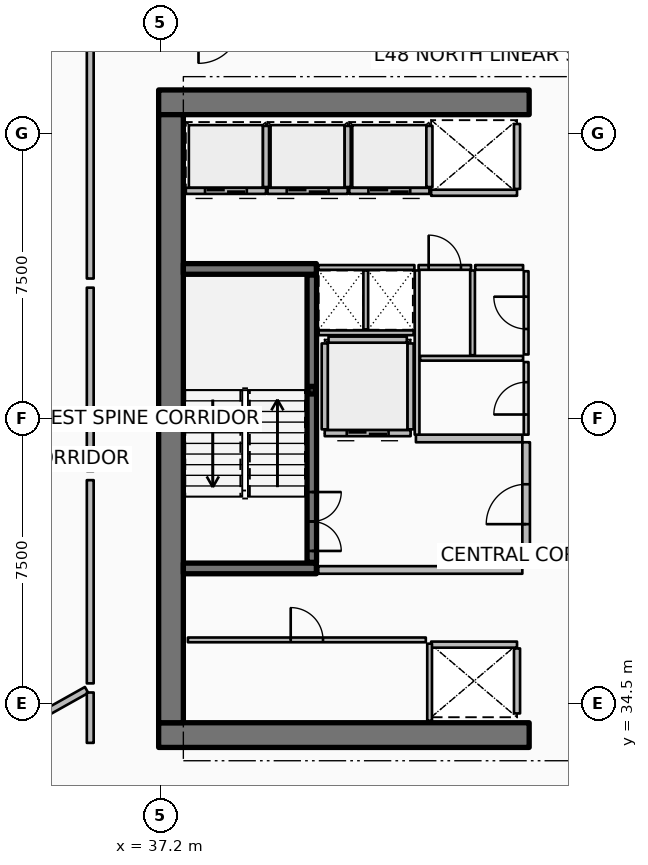
"""IFC4 building model, lengths in metres.
Left out: names, types, materials, properties, quantities, classifications, styles, units other than length and angle.
Written with IfcOpenShell. Run it as: python <this file> out.ifc"""

import sys

from ifc_helpers import new_model, si_unit, direction, frame, frame_2d, origin, origin_2d, place, context, subcontext, project, spatial, rectangle, hollow_rectangle, extrude, element, fill, save


model = new_model("IFC4")
c1 = context("Model", 3, precision=1e-05, world=origin(), true_north=direction((0.0, 1.0)))
c2 = subcontext(c1, "Body", "Model", "MODEL_VIEW")
j1 = project(units=[si_unit("LENGTHUNIT", "METRE"), si_unit("PLANEANGLEUNIT", "RADIAN")], contexts=[c1])
p1 = place(None, origin())
s1 = spatial("IfcSite", under=j1, at=p1, CompositionType="ELEMENT")
p2 = place(p1, origin())
s2 = spatial("IfcBuilding", under=s1, at=p2, CompositionType="ELEMENT")
p3 = place(p2, frame((0.0, 0.0, 191.55)))
s3 = spatial("IfcBuildingStorey", under=s2, at=p3, CompositionType="ELEMENT", Elevation=191.55)
for number, where, z_axis, x_axis in (
    (1, (37.15, 33.675, 0.0), (0.0, 0.0, 1.0), (1.0, 0.0, 0.0)),
    (2, (37.15, 50.325, 0.0), (0.0, 0.0, 1.0), (1.0, 0.0, 0.0)),
):
    element("IfcWall", number, at=place(p3, frame(where, z_axis=z_axis, x_axis=x_axis)), inside=s3, PredefinedType="SHEAR", context=c2, shape_type="SweptSolid", body=[
        extrude(rectangle(XDim=9.75, YDim=0.65, at=frame_2d((4.875, 0.0))), origin(), (0.0, 0.0, 1.0), 3.75),
    ])
p4 = place(p3, frame((37.475, 34.0, 0.0), z_axis=(0.0, 0.0, 1.0), x_axis=(0.0, 1.0, 0.0)))
e3 = element("IfcWall", 3, at=p4, inside=s3, PredefinedType="SHEAR", context=c2, shape_type="SweptSolid", body=[
    extrude(rectangle(XDim=16.0, YDim=0.65, at=frame_2d((8.0, 0.0))), origin(), (0.0, 0.0, 1.0), 3.75),
])
for number, where, z_axis, x_axis in (
    (4, (37.8, 38.06, 0.0), (0.0, 0.0, 1.0), (1.0, 0.0, 0.0)),
    (5, (37.8, 45.94, 0.0), (0.0, 0.0, 1.0), (1.0, 0.0, 0.0)),
):
    element("IfcWall", number, at=place(p3, frame(where, z_axis=z_axis, x_axis=x_axis)), inside=s3, PredefinedType="SHEAR", context=c2, shape_type="SweptSolid", body=[
        extrude(rectangle(XDim=3.5, YDim=0.28, at=frame_2d((1.75, 0.0))), origin(), (0.0, 0.0, 1.0), 3.75),
    ])
p5 = place(p3, frame((41.18, 42.75, 0.0), z_axis=(0.0, 0.0, 1.0), x_axis=(1.0, 0.0, 0.0)))
e6 = element("IfcColumn", 6, at=p5, inside=s3, PredefinedType="COLUMN", context=c2, shape_type="SweptSolid", body=[
    extrude(hollow_rectangle(XDim=0.2, YDim=0.2, WallThickness=0.01, InnerFilletRadius=0.01, OuterFilletRadius=0.02, at=origin_2d()), origin(), (0.0, 0.0, 1.0), 1.67),
])
p6 = place(p3, frame((41.18, 38.22, 0.0), z_axis=(0.0, 0.0, 1.0), x_axis=(0.0, 1.0, 0.0)))
e7 = element("IfcWall", 7, at=p6, inside=s3, PredefinedType="SOLIDWALL", context=c2, shape_type="SweptSolid", body=[
    extrude(rectangle(XDim=7.56, YDim=0.25, at=frame_2d((3.78, 0.0))), origin(), (0.0, 0.0, 1.0), 3.5),
])
p7 = place(p6, frame((0.3, 0.0, 0.0)))
e8 = element("IfcOpeningElement", 8, at=p7, cuts=e7, PredefinedType="OPENING", context=c2, shape_type="SweptSolid", body=[
    extrude(rectangle(XDim=1.55, YDim=2.15, at=frame_2d((0.775, 1.075))), frame((0.0, 0.135, 0.0), z_axis=(0.0, -1.0, 0.0), x_axis=(1.0, 0.0, 0.0)), (0.0, 0.0, 1.0), 0.27),
])
p8 = place(p3, frame((39.975, 47.995, 0.0), z_axis=(0.0, 0.0, 1.0), x_axis=(-1.0, 0.0, 0.0)))
e9 = element("IfcWall", 9, at=p8, inside=s3, PredefinedType="PARTITIONING", context=c2, shape_type="SweptSolid", body=[
    extrude(rectangle(XDim=2.11, YDim=0.16, at=frame_2d((1.055, 0.0))), origin(), (0.0, 0.0, 1.0), 3.5),
])
p9 = place(p8, frame((0.505, 0.0, 0.0)))
e10 = element("IfcOpeningElement", 10, at=p9, cuts=e9, PredefinedType="OPENING", context=c2, shape_type="SweptSolid", body=[
    extrude(rectangle(XDim=1.1, YDim=2.1, at=frame_2d((0.55, 1.05))), frame((0.0, 0.09, 0.0), z_axis=(0.0, -1.0, 0.0), x_axis=(1.0, 0.0, 0.0)), (0.0, 0.0, 1.0), 0.18),
])
p10 = place(p3, frame((39.975, 48.095, 0.0), z_axis=(0.0, 0.0, 1.0), x_axis=(0.0, 1.0, 0.0)))
e11 = element("IfcWall", 11, at=p10, inside=s3, PredefinedType="PARTITIONING", context=c2, shape_type="SweptSolid", body=[
    extrude(rectangle(XDim=1.61, YDim=0.16, at=frame_2d((0.805, 0.0))), origin(), (0.0, 0.0, 1.0), 3.5),
])
p11 = place(p3, frame((42.125, 47.995, 0.0), z_axis=(0.0, 0.0, 1.0), x_axis=(-1.0, 0.0, 0.0)))
e12 = element("IfcWall", 12, at=p11, inside=s3, PredefinedType="PARTITIONING", context=c2, shape_type="SweptSolid", body=[
    extrude(rectangle(XDim=2.11, YDim=0.16, at=frame_2d((1.055, 0.0))), origin(), (0.0, 0.0, 1.0), 3.5),
])
p12 = place(p11, frame((0.505, 0.0, 0.0)))
e13 = element("IfcOpeningElement", 13, at=p12, cuts=e12, PredefinedType="OPENING", context=c2, shape_type="SweptSolid", body=[
    extrude(rectangle(XDim=1.1, YDim=2.1, at=frame_2d((0.55, 1.05))), frame((0.0, 0.09, 0.0), z_axis=(0.0, -1.0, 0.0), x_axis=(1.0, 0.0, 0.0)), (0.0, 0.0, 1.0), 0.18),
])
p13 = place(p3, frame((42.125, 48.095, 0.0), z_axis=(0.0, 0.0, 1.0), x_axis=(0.0, 1.0, 0.0)))
e14 = element("IfcWall", 14, at=p13, inside=s3, PredefinedType="PARTITIONING", context=c2, shape_type="SweptSolid", body=[
    extrude(rectangle(XDim=1.61, YDim=0.16, at=frame_2d((0.805, 0.0))), origin(), (0.0, 0.0, 1.0), 3.5),
])
p14 = place(p3, frame((44.275, 47.995, 0.0), z_axis=(0.0, 0.0, 1.0), x_axis=(-1.0, 0.0, 0.0)))
e15 = element("IfcWall", 15, at=p14, inside=s3, PredefinedType="PARTITIONING", context=c2, shape_type="SweptSolid", body=[
    extrude(rectangle(XDim=2.11, YDim=0.16, at=frame_2d((1.055, 0.0))), origin(), (0.0, 0.0, 1.0), 3.5),
])
p15 = place(p14, frame((0.505, 0.0, 0.0)))
e16 = element("IfcOpeningElement", 16, at=p15, cuts=e15, PredefinedType="OPENING", context=c2, shape_type="SweptSolid", body=[
    extrude(rectangle(XDim=1.1, YDim=2.1, at=frame_2d((0.55, 1.05))), frame((0.0, 0.09, 0.0), z_axis=(0.0, -1.0, 0.0), x_axis=(1.0, 0.0, 0.0)), (0.0, 0.0, 1.0), 0.18),
])
p16 = place(p3, frame((44.275, 48.095, 0.0), z_axis=(0.0, 0.0, 1.0), x_axis=(0.0, 1.0, 0.0)))
e17 = element("IfcWall", 17, at=p16, inside=s3, PredefinedType="PARTITIONING", context=c2, shape_type="SweptSolid", body=[
    extrude(rectangle(XDim=1.61, YDim=0.16, at=frame_2d((0.805, 0.0))), origin(), (0.0, 0.0, 1.0), 3.5),
])
p17 = place(p3, frame((46.58, 47.945, 0.0), z_axis=(0.0, 0.0, 1.0), x_axis=(-1.0, 0.0, 0.0)))
e18 = element("IfcWall", 18, at=p17, inside=s3, PredefinedType="PARTITIONING", context=c2, shape_type="SweptSolid", body=[
    extrude(rectangle(XDim=2.26, YDim=0.16, at=frame_2d((1.13, 0.0))), origin(), (0.0, 0.0, 1.0), 3.5),
])
p18 = place(p3, frame((46.58, 48.045, 0.0), z_axis=(0.0, 0.0, 1.0), x_axis=(0.0, 1.0, 0.0)))
e19 = element("IfcWall", 19, at=p18, inside=s3, PredefinedType="PARTITIONING", context=c2, shape_type="SweptSolid", body=[
    extrude(rectangle(XDim=1.71, YDim=0.16, at=frame_2d((0.855, 0.0))), origin(), (0.0, 0.0, 1.0), 3.5),
])
p19 = place(p3, frame((44.32, 36.055, 0.0), z_axis=(0.0, 0.0, 1.0), x_axis=(1.0, 0.0, 0.0)))
e20 = element("IfcWall", 20, at=p19, inside=s3, PredefinedType="PARTITIONING", context=c2, shape_type="SweptSolid", body=[
    extrude(rectangle(XDim=2.26, YDim=0.16, at=frame_2d((1.13, 0.0))), origin(), (0.0, 0.0, 1.0), 3.5),
])
p20 = place(p3, frame((46.58, 34.245, 0.0), z_axis=(0.0, 0.0, 1.0), x_axis=(0.0, 1.0, 0.0)))
e21 = element("IfcWall", 21, at=p20, inside=s3, PredefinedType="PARTITIONING", context=c2, shape_type="SweptSolid", body=[
    extrude(rectangle(XDim=1.71, YDim=0.16, at=frame_2d((0.855, 0.0))), origin(), (0.0, 0.0, 1.0), 3.5),
])
p21 = place(p3, frame((43.78, 41.62, 0.0), z_axis=(0.0, 0.0, 1.0), x_axis=(-1.0, 0.0, 0.0)))
e22 = element("IfcWall", 22, at=p21, inside=s3, PredefinedType="PARTITIONING", context=c2, shape_type="SweptSolid", body=[
    extrude(rectangle(XDim=2.26, YDim=0.16, at=frame_2d((1.13, 0.0))), origin(), (0.0, 0.0, 1.0), 3.5),
])
p22 = place(p21, frame((0.58, 0.0, 0.0)))
e23 = element("IfcOpeningElement", 23, at=p22, cuts=e22, PredefinedType="OPENING", context=c2, shape_type="SweptSolid", body=[
    extrude(rectangle(XDim=1.1, YDim=2.1, at=frame_2d((0.55, 1.05))), frame((0.0, 0.09, 0.0), z_axis=(0.0, -1.0, 0.0), x_axis=(1.0, 0.0, 0.0)), (0.0, 0.0, 1.0), 0.18),
])
for number, where, z_axis, x_axis in (
    (24, (43.78, 41.72, 0.0), (0.0, 0.0, 1.0), (0.0, 1.0, 0.0)),
    (25, (41.52, 41.72, 0.0), (0.0, 0.0, 1.0), (0.0, 1.0, 0.0)),
):
    element("IfcWall", number, at=place(p3, frame(where, z_axis=z_axis, x_axis=x_axis)), inside=s3, PredefinedType="PARTITIONING", context=c2, shape_type="SweptSolid", body=[
        extrude(rectangle(XDim=2.26, YDim=0.16, at=frame_2d((1.13, 0.0))), origin(), (0.0, 0.0, 1.0), 3.5),
    ])
p23 = place(p3, frame((41.62, 44.08, 0.0), z_axis=(0.0, 0.0, 1.0), x_axis=(1.0, 0.0, 0.0)))
e26 = element("IfcWall", 26, at=p23, inside=s3, PredefinedType="PARTITIONING", context=c2, shape_type="SweptSolid", body=[
    extrude(rectangle(XDim=2.06, YDim=0.16, at=frame_2d((1.03, 0.0))), origin(), (0.0, 0.0, 1.0), 3.5),
])
p24 = place(p3, frame((44.28, 34.05, 0.0), z_axis=(0.0, 0.0, 1.0), x_axis=(0.0, 1.0, 0.0)))
e27 = element("IfcWall", 27, at=p24, inside=s3, PredefinedType="PARTITIONING", context=c2, shape_type="SweptSolid", body=[
    extrude(rectangle(XDim=2.03, YDim=0.125, at=frame_2d((1.015, 0.0))), origin(), (0.0, 0.0, 1.0), 2.94),
])
p25 = place(p3, frame((37.92, 36.18, 0.0), z_axis=(0.0, 0.0, 1.0), x_axis=(1.0, 0.0, 0.0)))
e28 = element("IfcWall", 28, at=p25, inside=s3, PredefinedType="PARTITIONING", context=c2, shape_type="SweptSolid", body=[
    extrude(rectangle(XDim=6.26, YDim=0.125, at=frame_2d((3.13, 0.0))), origin(), (0.0, 0.0, 1.0), 2.94),
])
p26 = place(p25, frame((2.705, 0.0, 0.0)))
e29 = element("IfcOpeningElement", 29, at=p26, cuts=e28, PredefinedType="OPENING", context=c2, shape_type="SweptSolid", body=[
    extrude(rectangle(XDim=0.85, YDim=2.06, at=frame_2d((0.425, 1.03))), frame((0.0, 0.073, 0.0), z_axis=(0.0, -1.0, 0.0), x_axis=(1.0, 0.0, 0.0)), (0.0, 0.0, 1.0), 0.145),
])
p27 = place(p3, frame((41.35, 38.02, 0.0), z_axis=(0.0, 0.0, 1.0), x_axis=(1.0, 0.0, 0.0)))
e30 = element("IfcWall", 30, at=p27, inside=s3, PredefinedType="PARTITIONING", context=c2, shape_type="SweptSolid", body=[
    extrude(rectangle(XDim=5.37, YDim=0.2, at=frame_2d((2.685, 0.0))), origin(), (0.0, 0.0, 1.0), 3.5),
])
p28 = place(p3, frame((43.92, 41.48, 0.0), z_axis=(0.0, 0.0, 1.0), x_axis=(1.0, 0.0, 0.0)))
e31 = element("IfcWall", 31, at=p28, inside=s3, PredefinedType="PARTITIONING", context=c2, shape_type="SweptSolid", body=[
    extrude(rectangle(XDim=2.8, YDim=0.2, at=frame_2d((1.4, 0.0))), origin(), (0.0, 0.0, 1.0), 3.5),
])
p29 = place(p3, frame((46.82, 38.12, 0.0), z_axis=(0.0, 0.0, 1.0), x_axis=(0.0, 1.0, 0.0)))
e32 = element("IfcWall", 32, at=p29, inside=s3, PredefinedType="PARTITIONING", context=c2, shape_type="SweptSolid", body=[
    extrude(rectangle(XDim=3.26, YDim=0.2, at=frame_2d((1.63, 0.0))), origin(), (0.0, 0.0, 1.0), 3.5),
])
p30 = place(p29, frame((1.105, 0.0, 0.0)))
e33 = element("IfcOpeningElement", 33, at=p30, cuts=e32, PredefinedType="OPENING", context=c2, shape_type="SweptSolid", body=[
    extrude(rectangle(XDim=1.05, YDim=2.1, at=frame_2d((0.525, 1.05))), frame((0.0, 0.11, 0.0), z_axis=(0.0, -1.0, 0.0), x_axis=(1.0, 0.0, 0.0)), (0.0, 0.0, 1.0), 0.22),
])
p31 = place(p3, frame((41.36, 44.26, 0.0), z_axis=(0.0, 0.0, 1.0), x_axis=(1.0, 0.0, 0.0)))
e34 = element("IfcWall", 34, at=p31, inside=s3, PredefinedType="PARTITIONING", context=c2, shape_type="SweptSolid", body=[
    extrude(rectangle(XDim=2.5, YDim=0.125, at=frame_2d((1.25, 0.0))), origin(), (0.0, 0.0, 1.0), 2.94),
])
p32 = place(p3, frame((42.6, 44.35, 0.0), z_axis=(0.0, 0.0, 1.0), x_axis=(0.0, 1.0, 0.0)))
e35 = element("IfcWall", 35, at=p32, inside=s3, PredefinedType="PARTITIONING", context=c2, shape_type="SweptSolid", body=[
    extrude(rectangle(XDim=1.55, YDim=0.125, at=frame_2d((0.775, 0.0))), origin(), (0.0, 0.0, 1.0), 2.94),
])
p33 = place(p3, frame((43.95, 41.58, 0.0), z_axis=(0.0, 0.0, 1.0), x_axis=(0.0, 1.0, 0.0)))
e36 = element("IfcWall", 36, at=p33, inside=s3, PredefinedType="PARTITIONING", context=c2, shape_type="SweptSolid", body=[
    extrude(rectangle(XDim=4.32, YDim=0.125, at=frame_2d((2.16, 0.0))), origin(), (0.0, 0.0, 1.0), 2.94),
])
p34 = place(p3, frame((44.03, 43.59, 0.0), z_axis=(0.0, 0.0, 1.0), x_axis=(1.0, 0.0, 0.0)))
e37 = element("IfcWall", 37, at=p34, inside=s3, PredefinedType="PARTITIONING", context=c2, shape_type="SweptSolid", body=[
    extrude(rectangle(XDim=2.71, YDim=0.125, at=frame_2d((1.355, 0.0))), origin(), (0.0, 0.0, 1.0), 2.94),
])
p35 = place(p3, frame((45.41, 43.67, 0.0), z_axis=(0.0, 0.0, 1.0), x_axis=(0.0, 1.0, 0.0)))
e38 = element("IfcWall", 38, at=p35, inside=s3, PredefinedType="PARTITIONING", context=c2, shape_type="SweptSolid", body=[
    extrude(rectangle(XDim=2.23, YDim=0.125, at=frame_2d((1.115, 0.0))), origin(), (0.0, 0.0, 1.0), 2.94),
])
p36 = place(p3, frame((46.82, 41.58, 0.0), z_axis=(0.0, 0.0, 1.0), x_axis=(0.0, 1.0, 0.0)))
e39 = element("IfcWall", 39, at=p36, inside=s3, PredefinedType="PARTITIONING", context=c2, shape_type="SweptSolid", body=[
    extrude(rectangle(XDim=1.91, YDim=0.125, at=frame_2d((0.955, 0.0))), origin(), (0.0, 0.0, 1.0), 2.94),
])
p37 = place(p36, frame((0.53, 0.0, 0.0)))
e40 = element("IfcOpeningElement", 40, at=p37, cuts=e39, PredefinedType="OPENING", context=c2, shape_type="SweptSolid", body=[
    extrude(rectangle(XDim=0.85, YDim=2.06, at=frame_2d((0.425, 1.03))), frame((0.0, 0.073, 0.0), z_axis=(0.0, -1.0, 0.0), x_axis=(1.0, 0.0, 0.0)), (0.0, 0.0, 1.0), 0.145),
])
p38 = place(p3, frame((46.82, 43.69, 0.0), z_axis=(0.0, 0.0, 1.0), x_axis=(0.0, 1.0, 0.0)))
e41 = element("IfcWall", 41, at=p38, inside=s3, PredefinedType="PARTITIONING", context=c2, shape_type="SweptSolid", body=[
    extrude(rectangle(XDim=2.19, YDim=0.125, at=frame_2d((1.095, 0.0))), origin(), (0.0, 0.0, 1.0), 2.94),
])
p39 = place(p38, frame((0.67, 0.0, 0.0)))
e42 = element("IfcOpeningElement", 42, at=p39, cuts=e41, PredefinedType="OPENING", context=c2, shape_type="SweptSolid", body=[
    extrude(rectangle(XDim=0.85, YDim=2.06, at=frame_2d((0.425, 1.03))), frame((0.0, 0.073, 0.0), z_axis=(0.0, -1.0, 0.0), x_axis=(1.0, 0.0, 0.0)), (0.0, 0.0, 1.0), 0.145),
])
p40 = place(p3, frame((41.35, 45.98, 0.0), z_axis=(0.0, 0.0, 1.0), x_axis=(1.0, 0.0, 0.0)))
e43 = element("IfcWall", 43, at=p40, inside=s3, PredefinedType="PARTITIONING", context=c2, shape_type="SweptSolid", body=[
    extrude(rectangle(XDim=2.53, YDim=0.125, at=frame_2d((1.265, 0.0))), origin(), (0.0, 0.0, 1.0), 2.94),
])
p41 = place(p3, frame((43.99, 45.98, 0.0), z_axis=(0.0, 0.0, 1.0), x_axis=(1.0, 0.0, 0.0)))
e44 = element("IfcWall", 44, at=p41, inside=s3, PredefinedType="PARTITIONING", context=c2, shape_type="SweptSolid", body=[
    extrude(rectangle(XDim=1.38, YDim=0.125, at=frame_2d((0.69, 0.0))), origin(), (0.0, 0.0, 1.0), 2.94),
])
p42 = place(p41, frame((0.265, 0.0, 0.0)))
e45 = element("IfcOpeningElement", 45, at=p42, cuts=e44, PredefinedType="OPENING", context=c2, shape_type="SweptSolid", body=[
    extrude(rectangle(XDim=0.85, YDim=2.06, at=frame_2d((0.425, 1.03))), frame((0.0, 0.073, 0.0), z_axis=(0.0, -1.0, 0.0), x_axis=(1.0, 0.0, 0.0)), (0.0, 0.0, 1.0), 0.145),
])
p43 = place(p3, frame((45.48, 45.98, 0.0), z_axis=(0.0, 0.0, 1.0), x_axis=(1.0, 0.0, 0.0)))
e46 = element("IfcWall", 46, at=p43, inside=s3, PredefinedType="PARTITIONING", context=c2, shape_type="SweptSolid", body=[
    extrude(rectangle(XDim=1.26, YDim=0.125, at=frame_2d((0.63, 0.0))), origin(), (0.0, 0.0, 1.0), 2.94),
])
p44 = place(p3, frame((35.254, 34.862, 0.0), z_axis=(0.0, 0.0, 1.0), x_axis=(-0.872489721771, -0.488632464541, 0.0)))
e47 = element("IfcWall", 47, at=p44, inside=s3, PredefinedType="PARTITIONING", context=c2, shape_type="SweptSolid", body=[
    extrude(rectangle(XDim=13.286, YDim=0.18, at=frame_2d((6.643, 0.0))), origin(), (0.0, 0.0, 1.0), 2.94),
])
p45 = place(p3, frame((35.35, 51.853, 0.0), z_axis=(0.0, 0.0, 1.0), x_axis=(0.0, -1.0, 0.0)))
e48 = element("IfcWall", 48, at=p45, inside=s3, PredefinedType="PARTITIONING", context=c2, shape_type="SweptSolid", body=[
    extrude(rectangle(XDim=6.165, YDim=0.18, at=frame_2d((3.083, 0.0))), origin(), (0.0, 0.0, 1.0), 2.94),
])
p46 = place(p3, frame((35.35, 45.448, 0.0), z_axis=(0.0, 0.0, 1.0), x_axis=(0.0, -1.0, 0.0)))
e49 = element("IfcWall", 49, at=p46, inside=s3, PredefinedType="PARTITIONING", context=c2, shape_type="SweptSolid", body=[
    extrude(rectangle(XDim=4.825, YDim=0.18, at=frame_2d((2.413, 0.0))), origin(), (0.0, 0.0, 1.0), 2.94),
])
p47 = place(p3, frame((35.35, 40.383, 0.0), z_axis=(0.0, 0.0, 1.0), x_axis=(0.0, -1.0, 0.0)))
e50 = element("IfcWall", 50, at=p47, inside=s3, PredefinedType="PARTITIONING", context=c2, shape_type="SweptSolid", body=[
    extrude(rectangle(XDim=5.347, YDim=0.18, at=frame_2d((2.674, 0.0))), origin(), (0.0, 0.0, 1.0), 2.94),
])
p48 = place(p3, frame((35.35, 34.796, 0.0), z_axis=(0.0, 0.0, 1.0), x_axis=(0.0, -1.0, 0.0)))
e51 = element("IfcWall", 51, at=p48, inside=s3, PredefinedType="PARTITIONING", context=c2, shape_type="SweptSolid", body=[
    extrude(rectangle(XDim=1.326, YDim=0.18, at=frame_2d((0.663, 0.0))), origin(), (0.0, 0.0, 1.0), 2.94),
])
p49 = place(p7, origin())
e52 = element("IfcDoor", 52, at=p49, inside=s3, OperationType="DOUBLE_DOOR_SINGLE_SWING", PredefinedType="DOOR", context=c2, shape_type="SweptSolid", body=[
    extrude(rectangle(XDim=1.55, YDim=2.15, at=frame_2d((0.775, 1.075))), frame((0.0, 0.025, 0.0), z_axis=(0.0, -1.0, 0.0), x_axis=(1.0, 0.0, 0.0)), (0.0, 0.0, 1.0), 0.05),
])
fill(e8, e52)
p50 = place(p9, origin())
e53 = element("IfcDoor", 53, at=p50, inside=s3, OperationType="DOUBLE_DOOR_SLIDING", PredefinedType="DOOR", context=c2, shape_type="SweptSolid", body=[
    extrude(rectangle(XDim=1.1, YDim=2.1, at=frame_2d((0.55, 1.05))), frame((0.0, 0.025, 0.0), z_axis=(0.0, -1.0, 0.0), x_axis=(1.0, 0.0, 0.0)), (0.0, 0.0, 1.0), 0.05),
])
fill(e10, e53)
p51 = place(p12, origin())
e54 = element("IfcDoor", 54, at=p51, inside=s3, OperationType="DOUBLE_DOOR_SLIDING", PredefinedType="DOOR", context=c2, shape_type="SweptSolid", body=[
    extrude(rectangle(XDim=1.1, YDim=2.1, at=frame_2d((0.55, 1.05))), frame((0.0, 0.025, 0.0), z_axis=(0.0, -1.0, 0.0), x_axis=(1.0, 0.0, 0.0)), (0.0, 0.0, 1.0), 0.05),
])
fill(e13, e54)
p52 = place(p15, origin())
e55 = element("IfcDoor", 55, at=p52, inside=s3, OperationType="DOUBLE_DOOR_SLIDING", PredefinedType="DOOR", context=c2, shape_type="SweptSolid", body=[
    extrude(rectangle(XDim=1.1, YDim=2.1, at=frame_2d((0.55, 1.05))), frame((0.0, 0.025, 0.0), z_axis=(0.0, -1.0, 0.0), x_axis=(1.0, 0.0, 0.0)), (0.0, 0.0, 1.0), 0.05),
])
fill(e16, e55)
p53 = place(p22, origin())
e56 = element("IfcDoor", 56, at=p53, inside=s3, OperationType="DOUBLE_DOOR_SLIDING", PredefinedType="DOOR", context=c2, shape_type="SweptSolid", body=[
    extrude(rectangle(XDim=1.1, YDim=2.1, at=frame_2d((0.55, 1.05))), frame((0.0, 0.025, 0.0), z_axis=(0.0, -1.0, 0.0), x_axis=(1.0, 0.0, 0.0)), (0.0, 0.0, 1.0), 0.05),
])
fill(e23, e56)
p54 = place(p26, origin())
e57 = element("IfcDoor", 57, at=p54, inside=s3, OperationType="SINGLE_SWING_LEFT", PredefinedType="DOOR", context=c2, shape_type="SweptSolid", body=[
    extrude(rectangle(XDim=0.85, YDim=2.06, at=frame_2d((0.425, 1.03))), frame((0.0, 0.025, 0.0), z_axis=(0.0, -1.0, 0.0), x_axis=(1.0, 0.0, 0.0)), (0.0, 0.0, 1.0), 0.05),
])
fill(e29, e57)
p55 = place(p30, origin())
e58 = element("IfcDoor", 58, at=p55, inside=s3, OperationType="SINGLE_SWING_LEFT", PredefinedType="DOOR", context=c2, shape_type="SweptSolid", body=[
    extrude(rectangle(XDim=1.05, YDim=2.1, at=frame_2d((0.525, 1.05))), frame((0.0, 0.025, 0.0), z_axis=(0.0, -1.0, 0.0), x_axis=(1.0, 0.0, 0.0)), (0.0, 0.0, 1.0), 0.05),
])
fill(e33, e58)
p56 = place(p37, origin())
e59 = element("IfcDoor", 59, at=p56, inside=s3, OperationType="SINGLE_SWING_LEFT", PredefinedType="DOOR", context=c2, shape_type="SweptSolid", body=[
    extrude(rectangle(XDim=0.85, YDim=2.06, at=frame_2d((0.425, 1.03))), frame((0.0, 0.025, 0.0), z_axis=(0.0, -1.0, 0.0), x_axis=(1.0, 0.0, 0.0)), (0.0, 0.0, 1.0), 0.05),
])
fill(e40, e59)
p57 = place(p39, origin())
e60 = element("IfcDoor", 60, at=p57, inside=s3, OperationType="SINGLE_SWING_RIGHT", PredefinedType="DOOR", context=c2, shape_type="SweptSolid", body=[
    extrude(rectangle(XDim=0.85, YDim=2.06, at=frame_2d((0.425, 1.03))), frame((0.0, 0.025, 0.0), z_axis=(0.0, -1.0, 0.0), x_axis=(1.0, 0.0, 0.0)), (0.0, 0.0, 1.0), 0.05),
])
fill(e42, e60)
p58 = place(p42, origin())
e61 = element("IfcDoor", 61, at=p58, inside=s3, OperationType="SINGLE_SWING_LEFT", PredefinedType="DOOR", context=c2, shape_type="SweptSolid", body=[
    extrude(rectangle(XDim=0.85, YDim=2.06, at=frame_2d((0.425, 1.03))), frame((0.0, 0.025, 0.0), z_axis=(0.0, -1.0, 0.0), x_axis=(1.0, 0.0, 0.0)), (0.0, 0.0, 1.0), 0.05),
])
fill(e45, e61)
save(model, sys.argv[1])
